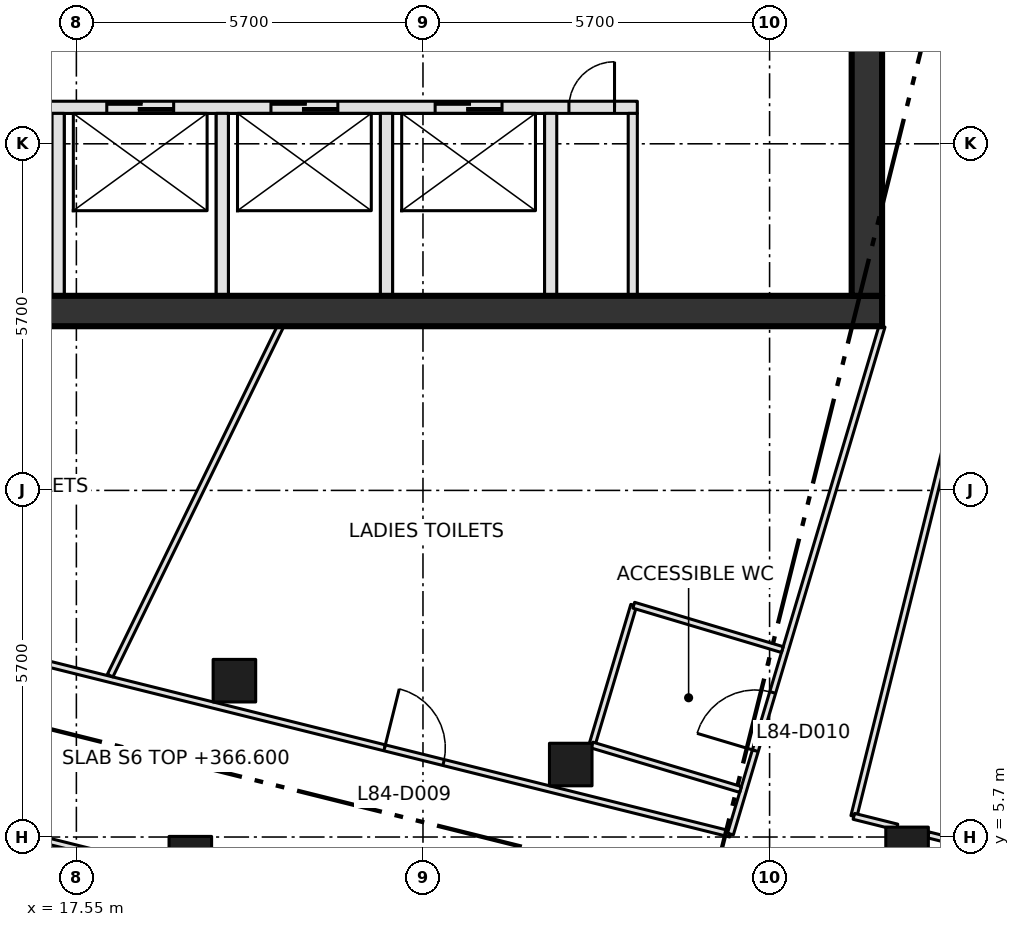
"""IFC4 building model, lengths in metres.
Left out: names, types, materials, properties, quantities, classifications, styles, units other than length and angle.
Written with IfcOpenShell. Run it as: python <this file> out.ifc"""

import sys

from ifc_helpers import new_model, si_unit, direction, frame, frame_2d, origin, origin_2d, place, context, subcontext, project, spatial, rectangle, extrude, element, fill, save


model = new_model("IFC4")
c1 = context("Model", 3, precision=1e-05, world=origin(), true_north=direction((0.0, 1.0)))
c2 = subcontext(c1, "Body", "Model", "MODEL_VIEW")
j1 = project(units=[si_unit("LENGTHUNIT", "METRE"), si_unit("PLANEANGLEUNIT", "RADIAN")], contexts=[c1])
p1 = place(None, origin())
s1 = spatial("IfcSite", under=j1, at=p1, CompositionType="ELEMENT")
p2 = place(p1, origin())
s2 = spatial("IfcBuilding", under=s1, at=p2, CompositionType="ELEMENT")
p3 = place(p2, frame((0.0, 0.0, 366.6)))
s3 = spatial("IfcBuildingStorey", under=s2, at=p3, CompositionType="ELEMENT", Elevation=366.6)
for number, where, z_axis, x_axis in (
    (1, (19.424, 5.36, 0.0), (0.0, 0.0, 1.0), (1.0, 0.0, 0.0)),
    (2, (20.149, 8.271, 0.0), (0.0, 0.0, 1.0), (1.0, 0.0, 0.0)),
    (3, (25.68, 6.892, 0.0), (0.0, 0.0, 1.0), (1.0, 0.0, 0.0)),
    (4, (31.211, 5.513, 0.0), (0.0, 0.0, 1.0), (1.0, 0.0, 0.0)),
):
    element("IfcColumn", number, at=place(p3, frame(where, z_axis=z_axis, x_axis=x_axis)), inside=s3, PredefinedType="COLUMN", context=c2, shape_type="SweptSolid", body=[
        extrude(rectangle(XDim=0.7, YDim=0.7, at=origin_2d()), origin(), (0.0, 0.0, 1.0), 4.2),
    ])
p4 = place(p3, frame((8.0, 14.35, -0.3), z_axis=(0.0, 0.0, 1.0), x_axis=(1.0, 0.0, 0.0)))
e5 = element("IfcWall", 5, at=p4, inside=s3, PredefinedType="SHEAR", context=c2, shape_type="SweptSolid", body=[
    extrude(rectangle(XDim=22.8, YDim=0.5, at=frame_2d((11.4, 0.0))), origin(), (0.0, 0.0, 1.0), 4.2),
])
p5 = place(p4, frame((2.3, 0.0, 0.3)))
e6 = element("IfcOpeningElement", 6, at=p5, cuts=e5, PredefinedType="OPENING", context=c2, shape_type="SweptSolid", body=[
    extrude(rectangle(XDim=1.8, YDim=2.1, at=frame_2d((0.9, 1.05))), frame((0.0, 0.26, 0.0), z_axis=(0.0, -1.0, 0.0), x_axis=(1.0, 0.0, 0.0)), (0.0, 0.0, 1.0), 0.52),
])
p6 = place(p3, frame((30.55, 14.6, -0.3), z_axis=(0.0, 0.0, 1.0), x_axis=(0.0, 1.0, 0.0)))
e7 = element("IfcWall", 7, at=p6, inside=s3, PredefinedType="SHEAR", context=c2, shape_type="SweptSolid", body=[
    extrude(rectangle(XDim=21.1, YDim=0.5, at=frame_2d((10.55, 0.0))), origin(), (0.0, 0.0, 1.0), 4.2),
])
p7 = place(p3, frame((13.35, 17.7, 0.0), z_axis=(0.0, 0.0, 1.0), x_axis=(1.0, 0.0, 0.0)))
e8 = element("IfcWall", 8, at=p7, inside=s3, PredefinedType="SOLIDWALL", context=c2, shape_type="SweptSolid", body=[
    extrude(rectangle(XDim=13.425, YDim=0.2, at=frame_2d((6.712, 0.0))), origin(), (0.0, 0.0, 1.0), 3.9),
])
p8 = place(p7, frame((2.0, 0.0, 0.0)))
e9 = element("IfcOpeningElement", 9, at=p8, cuts=e8, PredefinedType="OPENING", context=c2, shape_type="SweptSolid", body=[
    extrude(rectangle(XDim=1.1, YDim=2.1, at=frame_2d((0.55, 1.05))), frame((0.0, 0.11, 0.0), z_axis=(0.0, -1.0, 0.0), x_axis=(1.0, 0.0, 0.0)), (0.0, 0.0, 1.0), 0.22),
])
p9 = place(p7, frame((4.7, 0.0, 0.0)))
e10 = element("IfcOpeningElement", 10, at=p9, cuts=e8, PredefinedType="OPENING", context=c2, shape_type="SweptSolid", body=[
    extrude(rectangle(XDim=1.1, YDim=2.1, at=frame_2d((0.55, 1.05))), frame((0.0, 0.11, 0.0), z_axis=(0.0, -1.0, 0.0), x_axis=(1.0, 0.0, 0.0)), (0.0, 0.0, 1.0), 0.22),
])
p10 = place(p7, frame((7.4, 0.0, 0.0)))
e11 = element("IfcOpeningElement", 11, at=p10, cuts=e8, PredefinedType="OPENING", context=c2, shape_type="SweptSolid", body=[
    extrude(rectangle(XDim=1.1, YDim=2.1, at=frame_2d((0.55, 1.05))), frame((0.0, 0.11, 0.0), z_axis=(0.0, -1.0, 0.0), x_axis=(1.0, 0.0, 0.0)), (0.0, 0.0, 1.0), 0.22),
])
p11 = place(p7, frame((10.1, 0.0, 0.0)))
e12 = element("IfcOpeningElement", 12, at=p11, cuts=e8, PredefinedType="OPENING", context=c2, shape_type="SweptSolid", body=[
    extrude(rectangle(XDim=1.1, YDim=2.1, at=frame_2d((0.55, 1.05))), frame((0.0, 0.11, 0.0), z_axis=(0.0, -1.0, 0.0), x_axis=(1.0, 0.0, 0.0)), (0.0, 0.0, 1.0), 0.22),
])
p12 = place(p7, frame((0.15, 0.0, 0.0)))
e13 = element("IfcOpeningElement", 13, at=p12, cuts=e8, PredefinedType="OPENING", context=c2, shape_type="SweptSolid", body=[
    extrude(rectangle(XDim=0.75, YDim=2.1, at=frame_2d((0.375, 1.05))), frame((0.0, 0.11, 0.0), z_axis=(0.0, -1.0, 0.0), x_axis=(1.0, 0.0, 0.0)), (0.0, 0.0, 1.0), 0.22),
])
p13 = place(p7, frame((12.3, 0.0, 0.0)))
e14 = element("IfcOpeningElement", 14, at=p13, cuts=e8, PredefinedType="OPENING", context=c2, shape_type="SweptSolid", body=[
    extrude(rectangle(XDim=0.75, YDim=2.1, at=frame_2d((0.375, 1.05))), frame((0.0, 0.11, 0.0), z_axis=(0.0, -1.0, 0.0), x_axis=(1.0, 0.0, 0.0)), (0.0, 0.0, 1.0), 0.22),
])
for number, where, z_axis, x_axis in (
    (15, (17.25, 14.6, 0.0), (0.0, 0.0, 1.0), (0.0, 1.0, 0.0)),
    (16, (19.95, 14.6, 0.0), (0.0, 0.0, 1.0), (0.0, 1.0, 0.0)),
    (17, (22.65, 14.6, 0.0), (0.0, 0.0, 1.0), (0.0, 1.0, 0.0)),
    (18, (25.35, 14.6, 0.0), (0.0, 0.0, 1.0), (0.0, 1.0, 0.0)),
):
    element("IfcWall", number, at=place(p3, frame(where, z_axis=z_axis, x_axis=x_axis)), inside=s3, PredefinedType="SOLIDWALL", context=c2, shape_type="SweptSolid", body=[
        extrude(rectangle(XDim=3.0, YDim=0.2, at=frame_2d((1.5, 0.0))), origin(), (0.0, 0.0, 1.0), 3.9),
    ])
p14 = place(p3, frame((26.7, 14.6, 0.0), z_axis=(0.0, 0.0, 1.0), x_axis=(0.0, 1.0, 0.0)))
e19 = element("IfcWall", 19, at=p14, inside=s3, PredefinedType="PARTITIONING", context=c2, shape_type="SweptSolid", body=[
    extrude(rectangle(XDim=3.0, YDim=0.15, at=frame_2d((1.5, 0.0))), origin(), (0.0, 0.0, 1.0), 3.9),
])
p15 = place(p3, frame((8.334, 7.815, 0.0), z_axis=(0.0, 0.0, 1.0), x_axis=(0.970312231044, -0.241855688968, 0.0)))
e20 = element("IfcWall", 20, at=p15, inside=s3, PredefinedType="PARTITIONING", context=c2, shape_type="SweptSolid", body=[
    extrude(rectangle(XDim=11.069, YDim=0.1, at=frame_2d((5.534, 0.0))), origin(), (0.0, 0.0, 1.0), 3.9),
])
p16 = place(p15, frame((4.78, 0.0, 0.0)))
e21 = element("IfcOpeningElement", 21, at=p16, cuts=e20, PredefinedType="OPENING", context=c2, shape_type="SweptSolid", body=[
    extrude(rectangle(XDim=1.8, YDim=2.1, at=frame_2d((0.9, 1.05))), frame((0.0, 0.06, 0.0), z_axis=(0.0, -1.0, 0.0), x_axis=(1.0, 0.0, 0.0)), (0.0, 0.0, 1.0), 0.12),
])
p17 = place(p3, frame((9.017, 10.558, 0.0), z_axis=(0.0, 0.0, 1.0), x_axis=(0.970297621765, -0.241914293082, 0.0)))
e22 = element("IfcWall", 22, at=p17, inside=s3, PredefinedType="PARTITIONING", context=c2, shape_type="SweptSolid", body=[
    extrude(rectangle(XDim=19.879, YDim=0.1, at=frame_2d((9.94, 0.0))), origin(), (0.0, 0.0, 1.0), 3.9),
])
p18 = place(p17, frame((4.18, 0.0, 0.0)))
e23 = element("IfcOpeningElement", 23, at=p18, cuts=e22, PredefinedType="OPENING", context=c2, shape_type="SweptSolid", body=[
    extrude(rectangle(XDim=1.0, YDim=2.1, at=frame_2d((0.5, 1.05))), frame((0.0, 0.06, 0.0), z_axis=(0.0, -1.0, 0.0), x_axis=(1.0, 0.0, 0.0)), (0.0, 0.0, 1.0), 0.12),
])
p19 = place(p17, frame((14.018, 0.0, 0.0)))
e24 = element("IfcOpeningElement", 24, at=p19, cuts=e22, PredefinedType="OPENING", context=c2, shape_type="SweptSolid", body=[
    extrude(rectangle(XDim=1.0, YDim=2.1, at=frame_2d((0.5, 1.05))), frame((0.0, 0.06, 0.0), z_axis=(0.0, -1.0, 0.0), x_axis=(1.0, 0.0, 0.0)), (0.0, 0.0, 1.0), 0.12),
])
p20 = place(p3, frame((28.306, 5.749, 0.0), z_axis=(0.0, 0.0, 1.0), x_axis=(0.286170650389, 0.958178667502, 0.0)))
e25 = element("IfcWall", 25, at=p20, inside=s3, PredefinedType="PARTITIONING", context=c2, shape_type="SweptSolid", body=[
    extrude(rectangle(XDim=8.716, YDim=0.1, at=frame_2d((4.358, 0.0))), origin(), (0.0, 0.0, 1.0), 3.9),
])
p21 = place(p20, frame((1.43, 0.0, 0.0)))
e26 = element("IfcOpeningElement", 26, at=p21, cuts=e25, PredefinedType="OPENING", context=c2, shape_type="SweptSolid", body=[
    extrude(rectangle(XDim=1.0, YDim=2.1, at=frame_2d((0.5, 1.05))), frame((0.0, 0.06, 0.0), z_axis=(0.0, -1.0, 0.0), x_axis=(1.0, 0.0, 0.0)), (0.0, 0.0, 1.0), 0.12),
])
p22 = place(p3, frame((30.336, 6.04, 0.0), z_axis=(0.0, 0.0, 1.0), x_axis=(0.2420145387, 0.970272623059, 0.0)))
e27 = element("IfcWall", 27, at=p22, inside=s3, PredefinedType="PARTITIONING", context=c2, shape_type="SweptSolid", body=[
    extrude(rectangle(XDim=7.276, YDim=0.1, at=frame_2d((3.638, 0.0))), origin(), (0.0, 0.0, 1.0), 3.9),
])
p23 = place(p3, frame((31.046, 5.863, 0.0), z_axis=(0.0, 0.0, 1.0), x_axis=(-0.970299315901, 0.241907497946, 0.0)))
e28 = element("IfcWall", 28, at=p23, inside=s3, PredefinedType="PARTITIONING", context=c2, shape_type="SweptSolid", body=[
    extrude(rectangle(XDim=0.732, YDim=0.1, at=frame_2d((0.366, 0.0))), origin(), (0.0, 0.0, 1.0), 3.9),
])
p24 = place(p3, frame((31.561, 5.735, 0.0), z_axis=(0.0, 0.0, 1.0), x_axis=(0.970267382462, -0.242035548071, 0.0)))
e29 = element("IfcWall", 29, at=p24, inside=s3, PredefinedType="PARTITIONING", context=c2, shape_type="SweptSolid", body=[
    extrude(rectangle(XDim=5.17, YDim=0.1, at=frame_2d((2.585, 0.0))), origin(), (0.0, 0.0, 1.0), 3.9),
])
p25 = place(p24, frame((1.28, 0.0, 0.0)))
e30 = element("IfcOpeningElement", 30, at=p25, cuts=e29, PredefinedType="OPENING", context=c2, shape_type="SweptSolid", body=[
    extrude(rectangle(XDim=1.0, YDim=2.1, at=frame_2d((0.5, 1.05))), frame((0.0, 0.06, 0.0), z_axis=(0.0, -1.0, 0.0), x_axis=(1.0, 0.0, 0.0)), (0.0, 0.0, 1.0), 0.12),
])
p26 = place(p3, frame((18.105, 8.354, 0.0), z_axis=(0.0, 0.0, 1.0), x_axis=(0.438424384383, 0.898768078638, 0.0)))
e31 = element("IfcWall", 31, at=p26, inside=s3, PredefinedType="PARTITIONING", context=c2, shape_type="SweptSolid", body=[
    extrude(rectangle(XDim=6.393, YDim=0.1, at=frame_2d((3.197, 0.0))), origin(), (0.0, 0.0, 1.0), 3.9),
])
p27 = place(p3, frame((26.03, 7.214, 0.0), z_axis=(0.0, 0.0, 1.0), x_axis=(0.286077381682, 0.958206518288, 0.0)))
e32 = element("IfcWall", 32, at=p27, inside=s3, PredefinedType="PARTITIONING", context=c2, shape_type="SweptSolid", body=[
    extrude(rectangle(XDim=2.398, YDim=0.1, at=frame_2d((1.199, 0.0))), origin(), (0.0, 0.0, 1.0), 3.9),
])
p28 = place(p3, frame((26.716, 9.512, 0.0), z_axis=(0.0, 0.0, 1.0), x_axis=(0.958168093169, -0.286206053804, 0.0)))
e33 = element("IfcWall", 33, at=p28, inside=s3, PredefinedType="PARTITIONING", context=c2, shape_type="SweptSolid", body=[
    extrude(rectangle(XDim=2.551, YDim=0.1, at=frame_2d((1.275, 0.0))), origin(), (0.0, 0.0, 1.0), 3.9),
])
p29 = place(p3, frame((28.473, 6.482, 0.0), z_axis=(0.0, 0.0, 1.0), x_axis=(-0.958136712348, 0.286311090338, 0.0)))
e34 = element("IfcWall", 34, at=p29, inside=s3, PredefinedType="PARTITIONING", context=c2, shape_type="SweptSolid", body=[
    extrude(rectangle(XDim=2.55, YDim=0.1, at=frame_2d((1.275, 0.0))), origin(), (0.0, 0.0, 1.0), 3.9),
])
p30 = place(p9, origin())
e35 = element("IfcDoor", 35, at=p30, inside=s3, OperationType="SLIDING_TO_LEFT", PredefinedType="DOOR", context=c2, shape_type="SweptSolid", body=[
    extrude(rectangle(XDim=1.1, YDim=2.1, at=frame_2d((0.55, 1.05))), frame((0.0, 0.025, 0.0), z_axis=(0.0, -1.0, 0.0), x_axis=(1.0, 0.0, 0.0)), (0.0, 0.0, 1.0), 0.05),
])
fill(e10, e35)
p31 = place(p10, origin())
e36 = element("IfcDoor", 36, at=p31, inside=s3, OperationType="SLIDING_TO_LEFT", PredefinedType="DOOR", context=c2, shape_type="SweptSolid", body=[
    extrude(rectangle(XDim=1.1, YDim=2.1, at=frame_2d((0.55, 1.05))), frame((0.0, 0.025, 0.0), z_axis=(0.0, -1.0, 0.0), x_axis=(1.0, 0.0, 0.0)), (0.0, 0.0, 1.0), 0.05),
])
fill(e11, e36)
p32 = place(p11, origin())
e37 = element("IfcDoor", 37, at=p32, inside=s3, OperationType="SLIDING_TO_LEFT", PredefinedType="DOOR", context=c2, shape_type="SweptSolid", body=[
    extrude(rectangle(XDim=1.1, YDim=2.1, at=frame_2d((0.55, 1.05))), frame((0.0, 0.025, 0.0), z_axis=(0.0, -1.0, 0.0), x_axis=(1.0, 0.0, 0.0)), (0.0, 0.0, 1.0), 0.05),
])
fill(e12, e37)
p33 = place(p13, origin())
e38 = element("IfcDoor", 38, at=p33, inside=s3, OperationType="SINGLE_SWING_RIGHT", PredefinedType="DOOR", context=c2, shape_type="SweptSolid", body=[
    extrude(rectangle(XDim=0.75, YDim=2.1, at=frame_2d((0.375, 1.05))), frame((0.0, 0.025, 0.0), z_axis=(0.0, -1.0, 0.0), x_axis=(1.0, 0.0, 0.0)), (0.0, 0.0, 1.0), 0.05),
])
fill(e14, e38)
p34 = place(p19, origin())
e39 = element("IfcDoor", 39, at=p34, inside=s3, OperationType="SINGLE_SWING_LEFT", PredefinedType="DOOR", context=c2, shape_type="SweptSolid", body=[
    extrude(rectangle(XDim=1.0, YDim=2.1, at=frame_2d((0.5, 1.05))), frame((0.0, 0.025, 0.0), z_axis=(0.0, -1.0, 0.0), x_axis=(1.0, 0.0, 0.0)), (0.0, 0.0, 1.0), 0.05),
])
fill(e24, e39)
p35 = place(p21, origin())
e40 = element("IfcDoor", 40, at=p35, inside=s3, OperationType="SINGLE_SWING_LEFT", PredefinedType="DOOR", context=c2, shape_type="SweptSolid", body=[
    extrude(rectangle(XDim=1.0, YDim=2.1, at=frame_2d((0.5, 1.05))), frame((0.0, 0.025, 0.0), z_axis=(0.0, -1.0, 0.0), x_axis=(1.0, 0.0, 0.0)), (0.0, 0.0, 1.0), 0.05),
])
fill(e26, e40)
save(model, sys.argv[1])
